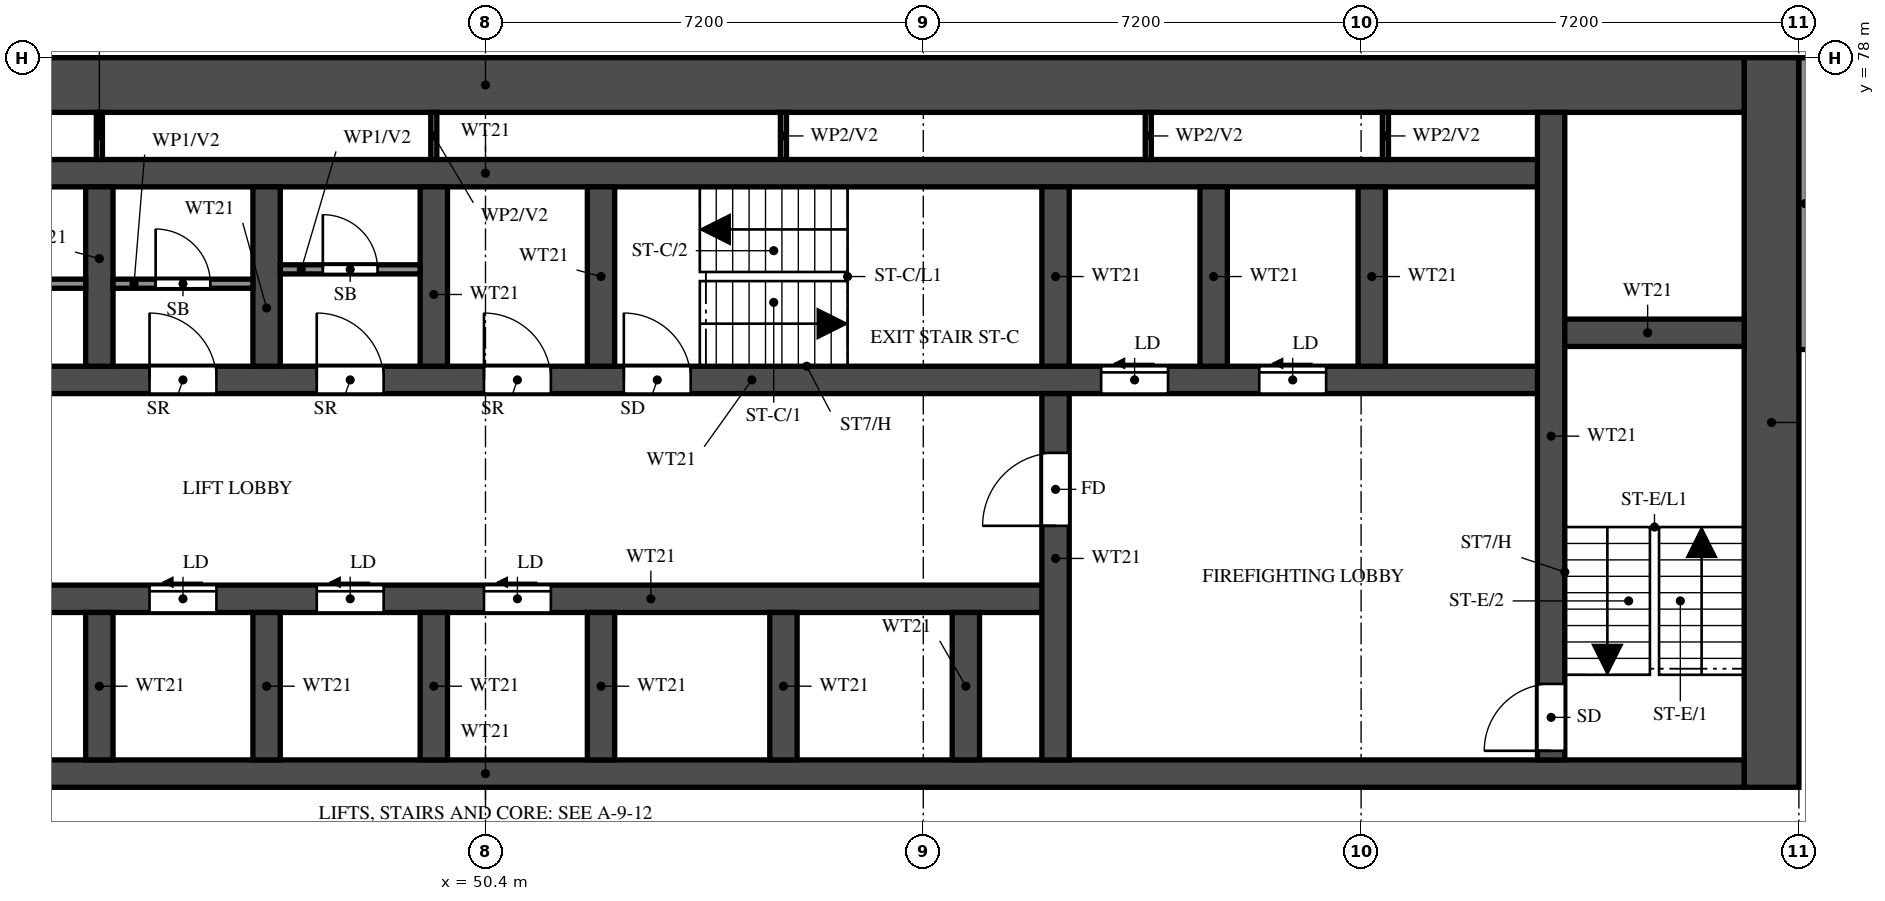
"""IFC4 building model, lengths in metres.
Left out: names, types, materials, properties, quantities, classifications, styles, units other than length and angle.
Written with IfcOpenShell. Run it as: python <this file> out.ifc"""

import sys

from ifc_helpers import new_model, si_unit, direction, frame, frame_2d, origin, place, context, subcontext, project, spatial, rectangle, extrude, element, fill, save


model = new_model("IFC4")
c1 = context("Model", 3, precision=1e-05, world=origin(), true_north=direction((0.0, 1.0)))
c2 = subcontext(c1, "Body", "Model", "MODEL_VIEW")
j1 = project(units=[si_unit("LENGTHUNIT", "METRE"), si_unit("PLANEANGLEUNIT", "RADIAN")], contexts=[c1])
p1 = place(None, origin())
s1 = spatial("IfcSite", under=j1, at=p1, CompositionType="ELEMENT")
p2 = place(p1, origin())
s2 = spatial("IfcBuilding", under=s1, at=p2, CompositionType="ELEMENT")
p3 = place(p2, frame((0.0, 0.0, 72.5)))
s3 = spatial("IfcBuildingStorey", under=s2, at=p3, CompositionType="ELEMENT", Elevation=72.5)
p4 = place(p3, frame((71.55, 66.0, 0.0), z_axis=(0.0, 0.0, 1.0), x_axis=(0.0, 1.0, 0.0)))
e1 = element("IfcWall", 1, at=p4, inside=s3, PredefinedType="SHEAR", context=c2, shape_type="SweptSolid", body=[
    extrude(rectangle(XDim=12.0, YDim=0.9, at=frame_2d((6.0, 0.0))), origin(), (0.0, 0.0, 1.0), 3.18),
])
p5 = place(p3, frame((29.7, 77.55, 0.0), z_axis=(0.0, 0.0, 1.0), x_axis=(1.0, 0.0, 0.0)))
e2 = element("IfcWall", 2, at=p5, inside=s3, PredefinedType="SHEAR", context=c2, shape_type="SweptSolid", body=[
    extrude(rectangle(XDim=41.4, YDim=0.9, at=frame_2d((20.7, 0.0))), origin(), (0.0, 0.0, 1.0), 3.18),
])
p6 = place(p3, frame((29.7, 66.225, 0.0), z_axis=(0.0, 0.0, 1.0), x_axis=(1.0, 0.0, 0.0)))
e3 = element("IfcWall", 3, at=p6, inside=s3, PredefinedType="SHEAR", context=c2, shape_type="SweptSolid", body=[
    extrude(rectangle(XDim=41.4, YDim=0.45, at=frame_2d((20.7, 0.0))), origin(), (0.0, 0.0, 1.0), 3.18),
])
p7 = place(p6, frame((0.925, 0.0, 0.0)))
e4 = element("IfcOpeningElement", 4, at=p7, cuts=e3, PredefinedType="OPENING", context=c2, shape_type="SweptSolid", body=[
    extrude(rectangle(XDim=1.1, YDim=2.1, at=frame_2d((0.55, 1.05))), frame((0.0, 0.235, 0.0), z_axis=(0.0, -1.0, 0.0), x_axis=(1.0, 0.0, 0.0)), (0.0, 0.0, 1.0), 0.47),
])
p8 = place(p6, frame((3.738, 0.0, 0.0)))
e5 = element("IfcOpeningElement", 5, at=p8, cuts=e3, PredefinedType="OPENING", context=c2, shape_type="SweptSolid", body=[
    extrude(rectangle(XDim=1.8, YDim=2.1, at=frame_2d((0.9, 1.05))), frame((0.0, 0.235, 0.0), z_axis=(0.0, -1.0, 0.0), x_axis=(1.0, 0.0, 0.0)), (0.0, 0.0, 1.0), 0.47),
])
p9 = place(p3, frame((35.575, 69.1, 0.0), z_axis=(0.0, 0.0, 1.0), x_axis=(1.0, 0.0, 0.0)))
e6 = element("IfcWall", 6, at=p9, inside=s3, PredefinedType="SHEAR", context=c2, shape_type="SweptSolid", body=[
    extrude(rectangle(XDim=24.2, YDim=0.45, at=frame_2d((12.1, 0.0))), origin(), (0.0, 0.0, 1.0), 3.18),
])
p10 = place(p9, frame((1.05, 0.0, 0.0)))
e7 = element("IfcOpeningElement", 7, at=p10, cuts=e6, PredefinedType="OPENING", context=c2, shape_type="SweptSolid", body=[
    extrude(rectangle(XDim=1.1, YDim=2.1, at=frame_2d((0.55, 1.05))), frame((0.0, 0.235, 0.0), z_axis=(0.0, -1.0, 0.0), x_axis=(1.0, 0.0, 0.0)), (0.0, 0.0, 1.0), 0.47),
])
p11 = place(p9, frame((3.8, 0.0, 0.0)))
e8 = element("IfcOpeningElement", 8, at=p11, cuts=e6, PredefinedType="OPENING", context=c2, shape_type="SweptSolid", body=[
    extrude(rectangle(XDim=1.1, YDim=2.1, at=frame_2d((0.55, 1.05))), frame((0.0, 0.235, 0.0), z_axis=(0.0, -1.0, 0.0), x_axis=(1.0, 0.0, 0.0)), (0.0, 0.0, 1.0), 0.47),
])
p12 = place(p9, frame((6.55, 0.0, 0.0)))
e9 = element("IfcOpeningElement", 9, at=p12, cuts=e6, PredefinedType="OPENING", context=c2, shape_type="SweptSolid", body=[
    extrude(rectangle(XDim=1.1, YDim=2.1, at=frame_2d((0.55, 1.05))), frame((0.0, 0.235, 0.0), z_axis=(0.0, -1.0, 0.0), x_axis=(1.0, 0.0, 0.0)), (0.0, 0.0, 1.0), 0.47),
])
p13 = place(p9, frame((9.3, 0.0, 0.0)))
e10 = element("IfcOpeningElement", 10, at=p13, cuts=e6, PredefinedType="OPENING", context=c2, shape_type="SweptSolid", body=[
    extrude(rectangle(XDim=1.1, YDim=2.1, at=frame_2d((0.55, 1.05))), frame((0.0, 0.235, 0.0), z_axis=(0.0, -1.0, 0.0), x_axis=(1.0, 0.0, 0.0)), (0.0, 0.0, 1.0), 0.47),
])
p14 = place(p9, frame((12.05, 0.0, 0.0)))
e11 = element("IfcOpeningElement", 11, at=p14, cuts=e6, PredefinedType="OPENING", context=c2, shape_type="SweptSolid", body=[
    extrude(rectangle(XDim=1.1, YDim=2.1, at=frame_2d((0.55, 1.05))), frame((0.0, 0.235, 0.0), z_axis=(0.0, -1.0, 0.0), x_axis=(1.0, 0.0, 0.0)), (0.0, 0.0, 1.0), 0.47),
])
p15 = place(p9, frame((14.8, 0.0, 0.0)))
e12 = element("IfcOpeningElement", 12, at=p15, cuts=e6, PredefinedType="OPENING", context=c2, shape_type="SweptSolid", body=[
    extrude(rectangle(XDim=1.1, YDim=2.1, at=frame_2d((0.55, 1.05))), frame((0.0, 0.235, 0.0), z_axis=(0.0, -1.0, 0.0), x_axis=(1.0, 0.0, 0.0)), (0.0, 0.0, 1.0), 0.47),
])
p16 = place(p3, frame((32.875, 72.7, 0.0), z_axis=(0.0, 0.0, 1.0), x_axis=(1.0, 0.0, 0.0)))
e13 = element("IfcWall", 13, at=p16, inside=s3, PredefinedType="SHEAR", context=c2, shape_type="SweptSolid", body=[
    extrude(rectangle(XDim=35.05, YDim=0.45, at=frame_2d((17.525, 0.0))), origin(), (0.0, 0.0, 1.0), 3.18),
])
p17 = place(p16, frame((19.8, 0.0, 0.0)))
e14 = element("IfcOpeningElement", 14, at=p17, cuts=e13, PredefinedType="OPENING", context=c2, shape_type="SweptSolid", body=[
    extrude(rectangle(XDim=1.1, YDim=2.1, at=frame_2d((0.55, 1.05))), frame((0.0, 0.235, 0.0), z_axis=(0.0, -1.0, 0.0), x_axis=(1.0, 0.0, 0.0)), (0.0, 0.0, 1.0), 0.47),
])
p18 = place(p16, frame((27.65, 0.0, 0.0)))
e15 = element("IfcOpeningElement", 15, at=p18, cuts=e13, PredefinedType="OPENING", context=c2, shape_type="SweptSolid", body=[
    extrude(rectangle(XDim=1.1, YDim=2.1, at=frame_2d((0.55, 1.05))), frame((0.0, 0.235, 0.0), z_axis=(0.0, -1.0, 0.0), x_axis=(1.0, 0.0, 0.0)), (0.0, 0.0, 1.0), 0.47),
])
p19 = place(p16, frame((30.25, 0.0, 0.0)))
e16 = element("IfcOpeningElement", 16, at=p19, cuts=e13, PredefinedType="OPENING", context=c2, shape_type="SweptSolid", body=[
    extrude(rectangle(XDim=1.1, YDim=2.1, at=frame_2d((0.55, 1.05))), frame((0.0, 0.235, 0.0), z_axis=(0.0, -1.0, 0.0), x_axis=(1.0, 0.0, 0.0)), (0.0, 0.0, 1.0), 0.47),
])
p20 = place(p16, frame((3.75, 0.0, 0.0)))
e17 = element("IfcOpeningElement", 17, at=p20, cuts=e13, PredefinedType="OPENING", context=c2, shape_type="SweptSolid", body=[
    extrude(rectangle(XDim=1.1, YDim=2.1, at=frame_2d((0.55, 1.05))), frame((0.0, 0.235, 0.0), z_axis=(0.0, -1.0, 0.0), x_axis=(1.0, 0.0, 0.0)), (0.0, 0.0, 1.0), 0.47),
])
p21 = place(p16, frame((6.5, 0.0, 0.0)))
e18 = element("IfcOpeningElement", 18, at=p21, cuts=e13, PredefinedType="OPENING", context=c2, shape_type="SweptSolid", body=[
    extrude(rectangle(XDim=1.1, YDim=2.1, at=frame_2d((0.55, 1.05))), frame((0.0, 0.235, 0.0), z_axis=(0.0, -1.0, 0.0), x_axis=(1.0, 0.0, 0.0)), (0.0, 0.0, 1.0), 0.47),
])
p22 = place(p16, frame((9.25, 0.0, 0.0)))
e19 = element("IfcOpeningElement", 19, at=p22, cuts=e13, PredefinedType="OPENING", context=c2, shape_type="SweptSolid", body=[
    extrude(rectangle(XDim=1.1, YDim=2.1, at=frame_2d((0.55, 1.05))), frame((0.0, 0.235, 0.0), z_axis=(0.0, -1.0, 0.0), x_axis=(1.0, 0.0, 0.0)), (0.0, 0.0, 1.0), 0.47),
])
p23 = place(p16, frame((12.0, 0.0, 0.0)))
e20 = element("IfcOpeningElement", 20, at=p23, cuts=e13, PredefinedType="OPENING", context=c2, shape_type="SweptSolid", body=[
    extrude(rectangle(XDim=1.1, YDim=2.1, at=frame_2d((0.55, 1.05))), frame((0.0, 0.235, 0.0), z_axis=(0.0, -1.0, 0.0), x_axis=(1.0, 0.0, 0.0)), (0.0, 0.0, 1.0), 0.47),
])
p24 = place(p16, frame((14.75, 0.0, 0.0)))
e21 = element("IfcOpeningElement", 21, at=p24, cuts=e13, PredefinedType="OPENING", context=c2, shape_type="SweptSolid", body=[
    extrude(rectangle(XDim=1.1, YDim=2.1, at=frame_2d((0.55, 1.05))), frame((0.0, 0.235, 0.0), z_axis=(0.0, -1.0, 0.0), x_axis=(1.0, 0.0, 0.0)), (0.0, 0.0, 1.0), 0.47),
])
p25 = place(p16, frame((17.5, 0.0, 0.0)))
e22 = element("IfcOpeningElement", 22, at=p25, cuts=e13, PredefinedType="OPENING", context=c2, shape_type="SweptSolid", body=[
    extrude(rectangle(XDim=1.1, YDim=2.1, at=frame_2d((0.55, 1.05))), frame((0.0, 0.235, 0.0), z_axis=(0.0, -1.0, 0.0), x_axis=(1.0, 0.0, 0.0)), (0.0, 0.0, 1.0), 0.47),
])
p26 = place(p16, frame((0.913, 0.0, 0.0)))
e23 = element("IfcOpeningElement", 23, at=p26, cuts=e13, PredefinedType="OPENING", context=c2, shape_type="SweptSolid", body=[
    extrude(rectangle(XDim=1.1, YDim=2.1, at=frame_2d((0.55, 1.05))), frame((0.0, 0.235, 0.0), z_axis=(0.0, -1.0, 0.0), x_axis=(1.0, 0.0, 0.0)), (0.0, 0.0, 1.0), 0.47),
])
p27 = place(p3, frame((32.875, 76.1, 0.0), z_axis=(0.0, 0.0, 1.0), x_axis=(1.0, 0.0, 0.0)))
e24 = element("IfcWall", 24, at=p27, inside=s3, PredefinedType="SHEAR", context=c2, shape_type="SweptSolid", body=[
    extrude(rectangle(XDim=35.05, YDim=0.45, at=frame_2d((17.525, 0.0))), origin(), (0.0, 0.0, 1.0), 3.18),
])
p28 = place(p3, frame((67.925, 73.475, 0.0), z_axis=(0.0, 0.0, 1.0), x_axis=(1.0, 0.0, 0.0)))
e25 = element("IfcWall", 25, at=p28, inside=s3, PredefinedType="SHEAR", context=c2, shape_type="SweptSolid", body=[
    extrude(rectangle(XDim=3.175, YDim=0.45, at=frame_2d((1.587, 0.0))), origin(), (0.0, 0.0, 1.0), 3.18),
])
p29 = place(p3, frame((67.925, 66.45, 0.0), z_axis=(0.0, 0.0, 1.0), x_axis=(0.0, 1.0, 0.0)))
e26 = element("IfcWall", 26, at=p29, inside=s3, PredefinedType="SHEAR", context=c2, shape_type="SweptSolid", body=[
    extrude(rectangle(XDim=10.65, YDim=0.45, at=frame_2d((5.325, 0.0))), origin(), (0.0, 0.0, 1.0), 3.18),
])
p30 = place(p29, frame((0.15, 0.0, 0.0)))
e27 = element("IfcOpeningElement", 27, at=p30, cuts=e26, PredefinedType="OPENING", context=c2, shape_type="SweptSolid", body=[
    extrude(rectangle(XDim=1.1, YDim=2.1, at=frame_2d((0.55, 1.05))), frame((0.0, 0.235, 0.0), z_axis=(0.0, -1.0, 0.0), x_axis=(1.0, 0.0, 0.0)), (0.0, 0.0, 1.0), 0.47),
])
p31 = place(p3, frame((59.775, 66.45, 0.0), z_axis=(0.0, 0.0, 1.0), x_axis=(0.0, 1.0, 0.0)))
e28 = element("IfcWall", 28, at=p31, inside=s3, PredefinedType="SHEAR", context=c2, shape_type="SweptSolid", body=[
    extrude(rectangle(XDim=6.025, YDim=0.45, at=frame_2d((3.013, 0.0))), origin(), (0.0, 0.0, 1.0), 3.18),
])
p32 = place(p31, frame((3.85, 0.0, 0.0)))
e29 = element("IfcOpeningElement", 29, at=p32, cuts=e28, PredefinedType="OPENING", context=c2, shape_type="SweptSolid", body=[
    extrude(rectangle(XDim=1.2, YDim=2.1, at=frame_2d((0.6, 1.05))), frame((0.0, 0.235, 0.0), z_axis=(0.0, -1.0, 0.0), x_axis=(1.0, 0.0, 0.0)), (0.0, 0.0, 1.0), 0.47),
])
p33 = place(p3, frame((59.775, 72.925, 0.0), z_axis=(0.0, 0.0, 1.0), x_axis=(0.0, 1.0, 0.0)))
e30 = element("IfcWall", 30, at=p33, inside=s3, PredefinedType="SHEAR", context=c2, shape_type="SweptSolid", body=[
    extrude(rectangle(XDim=2.95, YDim=0.45, at=frame_2d((1.475, 0.0))), origin(), (0.0, 0.0, 1.0), 3.18),
])
for number, where, z_axis, x_axis in (
    (31, (44.05, 66.45, 0.0), (0.0, 0.0, 1.0), (0.0, 1.0, 0.0)),
    (32, (46.8, 66.45, 0.0), (0.0, 0.0, 1.0), (0.0, 1.0, 0.0)),
    (33, (49.55, 66.45, 0.0), (0.0, 0.0, 1.0), (0.0, 1.0, 0.0)),
    (34, (52.3, 66.45, 0.0), (0.0, 0.0, 1.0), (0.0, 1.0, 0.0)),
    (35, (55.3, 66.45, 0.0), (0.0, 0.0, 1.0), (0.0, 1.0, 0.0)),
    (36, (58.3, 66.45, 0.0), (0.0, 0.0, 1.0), (0.0, 1.0, 0.0)),
):
    element("IfcWall", number, at=place(p3, frame(where, z_axis=z_axis, x_axis=x_axis)), inside=s3, PredefinedType="SHEAR", context=c2, shape_type="SweptSolid", body=[
        extrude(rectangle(XDim=2.425, YDim=0.45, at=frame_2d((1.212, 0.0))), origin(), (0.0, 0.0, 1.0), 3.18),
    ])
for number, where, z_axis, x_axis in (
    (37, (44.05, 72.925, 0.0), (0.0, 0.0, 1.0), (0.0, 1.0, 0.0)),
    (38, (46.8, 72.925, 0.0), (0.0, 0.0, 1.0), (0.0, 1.0, 0.0)),
    (39, (49.55, 72.925, 0.0), (0.0, 0.0, 1.0), (0.0, 1.0, 0.0)),
    (40, (52.3, 72.925, 0.0), (0.0, 0.0, 1.0), (0.0, 1.0, 0.0)),
    (41, (62.375, 72.925, 0.0), (0.0, 0.0, 1.0), (0.0, 1.0, 0.0)),
    (42, (64.975, 72.925, 0.0), (0.0, 0.0, 1.0), (0.0, 1.0, 0.0)),
):
    element("IfcWall", number, at=place(p3, frame(where, z_axis=z_axis, x_axis=x_axis)), inside=s3, PredefinedType="SHEAR", context=c2, shape_type="SweptSolid", body=[
        extrude(rectangle(XDim=2.95, YDim=0.45, at=frame_2d((1.475, 0.0))), origin(), (0.0, 0.0, 1.0), 3.18),
    ])
p34 = place(p3, frame((41.525, 74.282, 0.0), z_axis=(0.0, 0.0, 1.0), x_axis=(1.0, 0.0, 0.0)))
e43 = element("IfcWall", 43, at=p34, inside=s3, PredefinedType="PARTITIONING", context=c2, shape_type="SweptSolid", body=[
    extrude(rectangle(XDim=2.3, YDim=0.15, at=frame_2d((1.15, 0.0))), origin(), (0.0, 0.0, 1.0), 3.18),
])
p35 = place(p34, frame((0.7, 0.0, 0.0)))
e44 = element("IfcOpeningElement", 44, at=p35, cuts=e43, PredefinedType="OPENING", context=c2, shape_type="SweptSolid", body=[
    extrude(rectangle(XDim=0.9, YDim=2.1, at=frame_2d((0.45, 1.05))), frame((0.0, 0.085, 0.0), z_axis=(0.0, -1.0, 0.0), x_axis=(1.0, 0.0, 0.0)), (0.0, 0.0, 1.0), 0.17),
])
p36 = place(p3, frame((44.275, 74.282, 0.0), z_axis=(0.0, 0.0, 1.0), x_axis=(1.0, 0.0, 0.0)))
e45 = element("IfcWall", 45, at=p36, inside=s3, PredefinedType="PARTITIONING", context=c2, shape_type="SweptSolid", body=[
    extrude(rectangle(XDim=2.3, YDim=0.15, at=frame_2d((1.15, 0.0))), origin(), (0.0, 0.0, 1.0), 3.18),
])
p37 = place(p36, frame((0.7, 0.0, 0.0)))
e46 = element("IfcOpeningElement", 46, at=p37, cuts=e45, PredefinedType="OPENING", context=c2, shape_type="SweptSolid", body=[
    extrude(rectangle(XDim=0.9, YDim=2.1, at=frame_2d((0.45, 1.05))), frame((0.0, 0.085, 0.0), z_axis=(0.0, -1.0, 0.0), x_axis=(1.0, 0.0, 0.0)), (0.0, 0.0, 1.0), 0.17),
])
p38 = place(p3, frame((47.025, 74.518, 0.0), z_axis=(0.0, 0.0, 1.0), x_axis=(1.0, 0.0, 0.0)))
e47 = element("IfcWall", 47, at=p38, inside=s3, PredefinedType="PARTITIONING", context=c2, shape_type="SweptSolid", body=[
    extrude(rectangle(XDim=2.3, YDim=0.15, at=frame_2d((1.15, 0.0))), origin(), (0.0, 0.0, 1.0), 3.18),
])
p39 = place(p38, frame((0.7, 0.0, 0.0)))
e48 = element("IfcOpeningElement", 48, at=p39, cuts=e47, PredefinedType="OPENING", context=c2, shape_type="SweptSolid", body=[
    extrude(rectangle(XDim=0.9, YDim=2.1, at=frame_2d((0.45, 1.05))), frame((0.0, 0.085, 0.0), z_axis=(0.0, -1.0, 0.0), x_axis=(1.0, 0.0, 0.0)), (0.0, 0.0, 1.0), 0.17),
])
for number, where, z_axis, x_axis in (
    (49, (44.05, 76.325, 0.0), (0.0, 0.0, 1.0), (0.0, 1.0, 0.0)),
    (50, (49.55, 76.325, 0.0), (0.0, 0.0, 1.0), (0.0, 1.0, 0.0)),
    (51, (55.3, 76.325, 0.0), (0.0, 0.0, 1.0), (0.0, 1.0, 0.0)),
    (52, (61.3, 76.325, 0.0), (0.0, 0.0, 1.0), (0.0, 1.0, 0.0)),
    (53, (65.2, 76.325, 0.0), (0.0, 0.0, 1.0), (0.0, 1.0, 0.0)),
):
    element("IfcWall", number, at=place(p3, frame(where, z_axis=z_axis, x_axis=x_axis)), inside=s3, PredefinedType="PARTITIONING", context=c2, shape_type="SweptSolid", body=[
        extrude(rectangle(XDim=0.775, YDim=0.1, at=frame_2d((0.388, 0.0))), origin(), (0.0, 0.0, 1.0), 3.18),
    ])
p40 = place(p3, frame((72.1, 73.2, 0.0), z_axis=(0.0, 0.0, 1.0), x_axis=(0.0, 1.0, 0.0)))
e54 = element("IfcWall", 54, at=p40, inside=s3, PredefinedType="SOLIDWALL", context=c2, shape_type="SweptSolid", body=[
    extrude(rectangle(XDim=4.8, YDim=0.2, at=frame_2d((2.4, 0.0))), origin(), (0.0, 0.0, 1.0), 3.18),
])
p41 = place(p17, origin())
e55 = element("IfcDoor", 55, at=p41, inside=s3, OperationType="SINGLE_SWING_LEFT", PredefinedType="DOOR", context=c2, shape_type="SweptSolid", body=[
    extrude(rectangle(XDim=1.1, YDim=2.1, at=frame_2d((0.55, 1.05))), frame((0.0, 0.025, 0.0), z_axis=(0.0, -1.0, 0.0), x_axis=(1.0, 0.0, 0.0)), (0.0, 0.0, 1.0), 0.05),
])
fill(e14, e55)
p42 = place(p30, origin())
e56 = element("IfcDoor", 56, at=p42, inside=s3, OperationType="SINGLE_SWING_LEFT", PredefinedType="DOOR", context=c2, shape_type="SweptSolid", body=[
    extrude(rectangle(XDim=1.1, YDim=2.1, at=frame_2d((0.55, 1.05))), frame((0.0, 0.025, 0.0), z_axis=(0.0, -1.0, 0.0), x_axis=(1.0, 0.0, 0.0)), (0.0, 0.0, 1.0), 0.05),
])
fill(e27, e56)
p43 = place(p32, origin())
e57 = element("IfcDoor", 57, at=p43, inside=s3, OperationType="SINGLE_SWING_RIGHT", PredefinedType="DOOR", context=c2, shape_type="SweptSolid", body=[
    extrude(rectangle(XDim=1.2, YDim=2.1, at=frame_2d((0.6, 1.05))), frame((0.0, 0.025, 0.0), z_axis=(0.0, -1.0, 0.0), x_axis=(1.0, 0.0, 0.0)), (0.0, 0.0, 1.0), 0.05),
])
fill(e29, e57)
p44 = place(p18, origin())
e58 = element("IfcDoor", 58, at=p44, inside=s3, OperationType="SLIDING_TO_LEFT", PredefinedType="DOOR", context=c2, shape_type="SweptSolid", body=[
    extrude(rectangle(XDim=1.1, YDim=2.1, at=frame_2d((0.55, 1.05))), frame((0.0, 0.025, 0.0), z_axis=(0.0, -1.0, 0.0), x_axis=(1.0, 0.0, 0.0)), (0.0, 0.0, 1.0), 0.05),
])
fill(e15, e58)
p45 = place(p19, origin())
e59 = element("IfcDoor", 59, at=p45, inside=s3, OperationType="SLIDING_TO_LEFT", PredefinedType="DOOR", context=c2, shape_type="SweptSolid", body=[
    extrude(rectangle(XDim=1.1, YDim=2.1, at=frame_2d((0.55, 1.05))), frame((0.0, 0.025, 0.0), z_axis=(0.0, -1.0, 0.0), x_axis=(1.0, 0.0, 0.0)), (0.0, 0.0, 1.0), 0.05),
])
fill(e16, e59)
p46 = place(p13, origin())
e60 = element("IfcDoor", 60, at=p46, inside=s3, OperationType="SLIDING_TO_LEFT", PredefinedType="DOOR", context=c2, shape_type="SweptSolid", body=[
    extrude(rectangle(XDim=1.1, YDim=2.1, at=frame_2d((0.55, 1.05))), frame((0.0, 0.025, 0.0), z_axis=(0.0, -1.0, 0.0), x_axis=(1.0, 0.0, 0.0)), (0.0, 0.0, 1.0), 0.05),
])
fill(e10, e60)
p47 = place(p14, origin())
e61 = element("IfcDoor", 61, at=p47, inside=s3, OperationType="SLIDING_TO_LEFT", PredefinedType="DOOR", context=c2, shape_type="SweptSolid", body=[
    extrude(rectangle(XDim=1.1, YDim=2.1, at=frame_2d((0.55, 1.05))), frame((0.0, 0.025, 0.0), z_axis=(0.0, -1.0, 0.0), x_axis=(1.0, 0.0, 0.0)), (0.0, 0.0, 1.0), 0.05),
])
fill(e11, e61)
p48 = place(p15, origin())
e62 = element("IfcDoor", 62, at=p48, inside=s3, OperationType="SLIDING_TO_LEFT", PredefinedType="DOOR", context=c2, shape_type="SweptSolid", body=[
    extrude(rectangle(XDim=1.1, YDim=2.1, at=frame_2d((0.55, 1.05))), frame((0.0, 0.025, 0.0), z_axis=(0.0, -1.0, 0.0), x_axis=(1.0, 0.0, 0.0)), (0.0, 0.0, 1.0), 0.05),
])
fill(e12, e62)
p49 = place(p23, origin())
e63 = element("IfcDoor", 63, at=p49, inside=s3, OperationType="SINGLE_SWING_LEFT", PredefinedType="DOOR", context=c2, shape_type="SweptSolid", body=[
    extrude(rectangle(XDim=1.1, YDim=2.1, at=frame_2d((0.55, 1.05))), frame((0.0, 0.025, 0.0), z_axis=(0.0, -1.0, 0.0), x_axis=(1.0, 0.0, 0.0)), (0.0, 0.0, 1.0), 0.05),
])
fill(e20, e63)
p50 = place(p37, origin())
e64 = element("IfcDoor", 64, at=p50, inside=s3, OperationType="SINGLE_SWING_RIGHT", PredefinedType="DOOR", context=c2, shape_type="SweptSolid", body=[
    extrude(rectangle(XDim=0.9, YDim=2.1, at=frame_2d((0.45, 1.05))), frame((0.0, 0.025, 0.0), z_axis=(0.0, -1.0, 0.0), x_axis=(1.0, 0.0, 0.0)), (0.0, 0.0, 1.0), 0.05),
])
fill(e46, e64)
p51 = place(p24, origin())
e65 = element("IfcDoor", 65, at=p51, inside=s3, OperationType="SINGLE_SWING_LEFT", PredefinedType="DOOR", context=c2, shape_type="SweptSolid", body=[
    extrude(rectangle(XDim=1.1, YDim=2.1, at=frame_2d((0.55, 1.05))), frame((0.0, 0.025, 0.0), z_axis=(0.0, -1.0, 0.0), x_axis=(1.0, 0.0, 0.0)), (0.0, 0.0, 1.0), 0.05),
])
fill(e21, e65)
p52 = place(p39, origin())
e66 = element("IfcDoor", 66, at=p52, inside=s3, OperationType="SINGLE_SWING_RIGHT", PredefinedType="DOOR", context=c2, shape_type="SweptSolid", body=[
    extrude(rectangle(XDim=0.9, YDim=2.1, at=frame_2d((0.45, 1.05))), frame((0.0, 0.025, 0.0), z_axis=(0.0, -1.0, 0.0), x_axis=(1.0, 0.0, 0.0)), (0.0, 0.0, 1.0), 0.05),
])
fill(e48, e66)
p53 = place(p25, origin())
e67 = element("IfcDoor", 67, at=p53, inside=s3, OperationType="SINGLE_SWING_LEFT", PredefinedType="DOOR", context=c2, shape_type="SweptSolid", body=[
    extrude(rectangle(XDim=1.1, YDim=2.1, at=frame_2d((0.55, 1.05))), frame((0.0, 0.025, 0.0), z_axis=(0.0, -1.0, 0.0), x_axis=(1.0, 0.0, 0.0)), (0.0, 0.0, 1.0), 0.05),
])
fill(e22, e67)
save(model, sys.argv[1])
